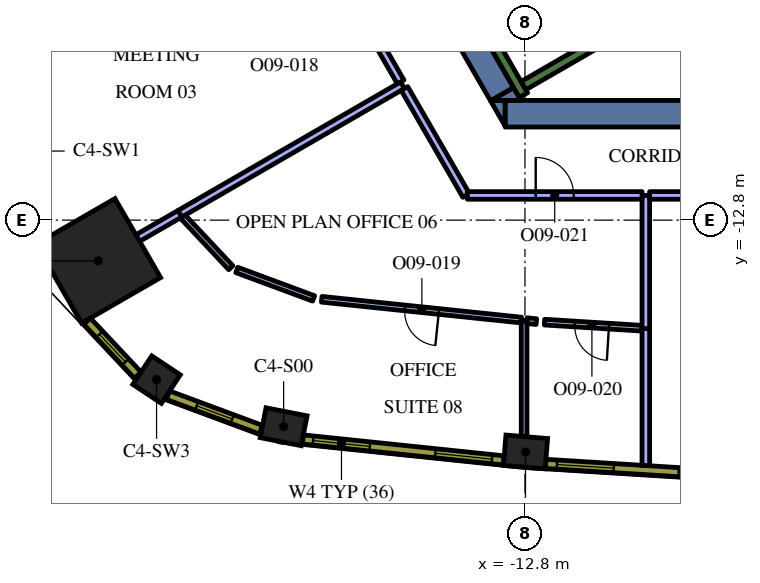
"""IFC4 building model, lengths in metres.
Left out: names, types, materials, properties, quantities, classifications, styles, units other than length and angle.
Written with IfcOpenShell. Run it as: python <this file> out.ifc"""

import sys

from ifc_helpers import new_model, si_unit, direction, frame, frame_2d, origin, origin_2d, place, context, subcontext, project, spatial, polyline, rectangle, outline, extrude, element, fill, save


model = new_model("IFC4")
c1 = context("Model", 3, precision=1e-05, world=origin(), true_north=direction((0.0, 1.0)))
c2 = subcontext(c1, "Body", "Model", "MODEL_VIEW")
j1 = project(units=[si_unit("LENGTHUNIT", "METRE"), si_unit("PLANEANGLEUNIT", "RADIAN")], contexts=[c1])
p1 = place(None, origin())
s1 = spatial("IfcSite", under=j1, at=p1, CompositionType="ELEMENT")
p2 = place(p1, origin())
s2 = spatial("IfcBuilding", under=s1, at=p2, CompositionType="ELEMENT")
p3 = place(p2, frame((0.0, 0.0, 239.4)))
s3 = spatial("IfcBuildingStorey", under=s2, at=p3, CompositionType="ELEMENT", Elevation=239.4)
p4 = place(p3, frame((-24.027, -13.872, 0.0), z_axis=(0.0, 0.0, 1.0), x_axis=(-0.866025403784, -0.5, 0.0)))
e1 = element("IfcColumn", 1, at=p4, inside=s3, PredefinedType="COLUMN", context=c2, shape_type="SweptSolid", body=[
    extrude(rectangle(XDim=2.4, YDim=2.4, at=origin_2d()), origin(), (0.0, 0.0, 1.0), 4.2),
])
for number, where, z_axis, x_axis in (
    (2, (-19.15, -18.237, 0.0), (0.0, 0.0, 1.0), (0.981, -0.192, 0.0)),
    (3, (-12.785, -18.9, 0.0), (0.0, 0.0, 1.0), (0.997, -0.083, 0.0)),
):
    element("IfcColumn", number, at=place(p3, frame(where, z_axis=z_axis, x_axis=x_axis)), inside=s3, PredefinedType="COLUMN", context=c2, shape_type="SweptSolid", body=[
        extrude(rectangle(XDim=1.1, YDim=0.8, at=origin_2d()), origin(), (0.0, 0.0, 1.0), 4.2),
    ])
p5 = place(p3, frame((-22.494, -16.997, 0.0), z_axis=(0.0, 0.0, 1.0), x_axis=(0.833238868178, -0.552913183563, 0.0)))
e4 = element("IfcColumn", 4, at=p5, inside=s3, PredefinedType="COLUMN", context=c2, shape_type="SweptSolid", body=[
    extrude(rectangle(XDim=0.9, YDim=0.9, at=origin_2d()), origin(), (0.0, 0.0, 1.0), 4.2),
])
p6 = place(p3, frame((8.904, -10.0, 0.0), z_axis=(0.0, 0.0, 1.0), x_axis=(-1.0, 0.0, 0.0)))
e5 = element("IfcWall", 5, at=p6, inside=s3, PredefinedType="SOLIDWALL", context=c2, shape_type="SweptSolid", body=[
    extrude(rectangle(XDim=22.226, YDim=0.7, at=frame_2d((11.113, 0.0))), origin(), (0.0, 0.0, 1.0), 4.2),
])
p7 = place(p3, origin())
e6 = element("IfcWall", 6, at=p7, inside=s3, PredefinedType="SOLIDWALL", context=c2, shape_type="SweptSolid", body=[
    extrude(outline(polyline([(-13.712, -9.65), (-13.324, -9.65), (-13.324, -10.322), (-13.712, -9.65)])), origin(), (0.0, 0.0, 1.0), 4.2),
])
p8 = place(p3, frame((-13.402, -9.487, 0.0), z_axis=(0.0, 0.0, 1.0), x_axis=(-0.500020498207, 0.866013568815, 0.0)))
e7 = element("IfcWall", 7, at=p8, inside=s3, PredefinedType="SOLIDWALL", context=c2, shape_type="SweptSolid", body=[
    extrude(rectangle(XDim=3.829, YDim=0.7, at=frame_2d((1.915, 0.0))), origin(), (0.0, 0.0, 1.0), 4.2),
])
e8 = element("IfcWall", 8, at=p7, inside=s3, PredefinedType="SOLIDWALL", context=c2, shape_type="SweptSolid", body=[
    extrude(outline(polyline([(-12.904, -9.65), (-13.68, -9.65), (-13.098, -9.314), (-12.904, -9.65)])), origin(), (0.0, 0.0, 1.0), 4.2),
])
p9 = place(p3, frame((-12.84, -9.511, 0.0), z_axis=(0.0, 0.0, 1.0), x_axis=(-0.499997733992, 0.866026712061, 0.0)))
e9 = element("IfcWall", 9, at=p9, inside=s3, PredefinedType="SOLIDWALL", context=c2, shape_type="SweptSolid", body=[
    extrude(rectangle(XDim=3.634, YDim=0.25, at=frame_2d((1.817, 0.0))), origin(), (0.0, 0.0, 1.0), 4.2),
])
p10 = place(p3, frame((-12.84, -9.261, 0.0), z_axis=(0.0, 0.0, 1.0), x_axis=(0.866016039709, 0.500016218704, 0.0)))
e10 = element("IfcWall", 10, at=p10, inside=s3, PredefinedType="SOLIDWALL", context=c2, shape_type="SweptSolid", body=[
    extrude(rectangle(XDim=7.05, YDim=0.25, at=frame_2d((3.525, 0.0))), origin(), (0.0, 0.0, 1.0), 4.2),
])
p11 = place(p3, frame((-9.62, -19.257, 0.0), z_axis=(0.0, 0.0, 1.0), x_axis=(0.0, 1.0, 0.0)))
e11 = element("IfcWall", 11, at=p11, inside=s3, PredefinedType="PARTITIONING", context=c2, shape_type="SweptSolid", body=[
    extrude(rectangle(XDim=3.611, YDim=0.2, at=frame_2d((1.806, 0.0))), origin(), (0.0, 0.0, 1.0), 3.45),
])
p12 = place(p3, frame((-9.62, -15.654, 0.0), z_axis=(0.0, 0.0, 1.0), x_axis=(0.0, 1.0, 0.0)))
e12 = element("IfcWall", 12, at=p12, inside=s3, PredefinedType="PARTITIONING", context=c2, shape_type="SweptSolid", body=[
    extrude(rectangle(XDim=3.504, YDim=0.2, at=frame_2d((1.752, 0.0))), origin(), (0.0, 0.0, 1.0), 3.45),
])
p13 = place(p3, frame((-9.52, -12.15, 0.0), z_axis=(0.0, 0.0, 1.0), x_axis=(1.0, 0.0, 0.0)))
e13 = element("IfcWall", 13, at=p13, inside=s3, PredefinedType="PARTITIONING", context=c2, shape_type="SweptSolid", body=[
    extrude(rectangle(XDim=2.49, YDim=0.2, at=frame_2d((1.245, 0.0))), origin(), (0.0, 0.0, 1.0), 3.45),
])
p14 = place(p3, frame((-21.873, -12.628, 0.0), z_axis=(0.0, 0.0, 1.0), x_axis=(-0.866052988967, -0.499952218018, 0.0)))
e14 = element("IfcWall", 14, at=p14, inside=s3, PredefinedType="PARTITIONING", context=c2, shape_type="SweptSolid", body=[
    extrude(rectangle(XDim=1.288, YDim=0.2, at=frame_2d((0.644, 0.0))), origin(), (0.0, 0.0, 1.0), 3.45),
])
p15 = place(p3, frame((-16.021, -9.25, 0.0), z_axis=(0.0, 0.0, 1.0), x_axis=(-0.86602692059, -0.499997372806, 0.0)))
e15 = element("IfcWall", 15, at=p15, inside=s3, PredefinedType="PARTITIONING", context=c2, shape_type="SweptSolid", body=[
    extrude(rectangle(XDim=6.765, YDim=0.2, at=frame_2d((3.382, 0.0))), origin(), (0.0, 0.0, 1.0), 3.45),
])
p16 = place(p3, frame((-17.545, -6.612, 0.0), z_axis=(0.0, 0.0, 1.0), x_axis=(0.500006981563, -0.86602137294, 0.0)))
e16 = element("IfcWall", 16, at=p16, inside=s3, PredefinedType="PARTITIONING", context=c2, shape_type="SweptSolid", body=[
    extrude(rectangle(XDim=2.946, YDim=0.2, at=frame_2d((1.473, 0.0))), origin(), (0.0, 0.0, 1.0), 3.45),
])
p17 = place(p3, frame((-12.823, -15.437, 0.0), z_axis=(0.0, 0.0, 1.0), x_axis=(0.0, -1.0, 0.0)))
e17 = element("IfcWall", 17, at=p17, inside=s3, PredefinedType="PARTITIONING", context=c2, shape_type="SweptSolid", body=[
    extrude(rectangle(XDim=3.058, YDim=0.15, at=frame_2d((1.529, 0.0))), origin(), (0.0, 0.0, 1.0), 3.45),
])
p18 = place(p3, frame((-21.806, -12.705, 0.0), z_axis=(0.0, 0.0, 1.0), x_axis=(0.684700980092, -0.728824099396, 0.0)))
e18 = element("IfcWall", 18, at=p18, inside=s3, PredefinedType="PARTITIONING", context=c2, shape_type="SweptSolid", body=[
    extrude(rectangle(XDim=1.848, YDim=0.15, at=frame_2d((0.924, 0.0))), origin(), (0.0, 0.0, 1.0), 3.45),
])
p19 = place(p3, frame((-20.383, -14.111, 0.0), z_axis=(0.0, 0.0, 1.0), x_axis=(0.937598383102, -0.347720105838, 0.0)))
e19 = element("IfcWall", 19, at=p19, inside=s3, PredefinedType="PARTITIONING", context=c2, shape_type="SweptSolid", body=[
    extrude(rectangle(XDim=2.156, YDim=0.15, at=frame_2d((1.078, 0.0))), origin(), (0.0, 0.0, 1.0), 3.45),
])
p20 = place(p3, frame((-12.898, -15.429, 0.0), z_axis=(0.0, 0.0, 1.0), x_axis=(-0.99462039429, 0.103587022653, 0.0)))
e20 = element("IfcWall", 20, at=p20, inside=s3, PredefinedType="PARTITIONING", context=c2, shape_type="SweptSolid", body=[
    extrude(rectangle(XDim=5.279, YDim=0.15, at=frame_2d((2.64, 0.0))), origin(), (0.0, 0.0, 1.0), 3.45),
])
p21 = place(p20, frame((2.179, 0.0, 0.0)))
e21 = element("IfcOpeningElement", 21, at=p21, cuts=e20, PredefinedType="OPENING", context=c2, shape_type="SweptSolid", body=[
    extrude(rectangle(XDim=0.9, YDim=2.1, at=frame_2d((0.45, 1.05))), frame((0.0, 0.085, 0.0), z_axis=(0.0, -1.0, 0.0), x_axis=(1.0, 0.0, 0.0)), (0.0, 0.0, 1.0), 0.17),
])
p22 = place(p3, frame((-12.748, -15.445, 0.0), z_axis=(0.0, 0.0, 1.0), x_axis=(0.99468140225, -0.102999553487, 0.0)))
e22 = element("IfcWall", 22, at=p22, inside=s3, PredefinedType="PARTITIONING", context=c2, shape_type="SweptSolid", body=[
    extrude(rectangle(XDim=0.249, YDim=0.15, at=frame_2d((0.125, 0.0))), origin(), (0.0, 0.0, 1.0), 3.45),
])
p23 = place(p3, frame((-9.72, -15.644, 0.0), z_axis=(0.0, 0.0, 1.0), x_axis=(-0.998064382534, 0.062189133425, 0.0)))
e23 = element("IfcWall", 23, at=p23, inside=s3, PredefinedType="PARTITIONING", context=c2, shape_type="SweptSolid", body=[
    extrude(rectangle(XDim=2.571, YDim=0.15, at=frame_2d((1.286, 0.0))), origin(), (0.0, 0.0, 1.0), 3.45),
])
p24 = place(p23, frame((0.871, 0.0, 0.0)))
e24 = element("IfcOpeningElement", 24, at=p24, cuts=e23, PredefinedType="OPENING", context=c2, shape_type="SweptSolid", body=[
    extrude(rectangle(XDim=0.9, YDim=2.1, at=frame_2d((0.45, 1.05))), frame((0.0, 0.085, 0.0), z_axis=(0.0, -1.0, 0.0), x_axis=(1.0, 0.0, 0.0)), (0.0, 0.0, 1.0), 0.17),
])
p25 = place(p3, frame((-15.971, -9.337, 0.0), z_axis=(0.0, 0.0, 1.0), x_axis=(0.500010870188, -0.866019127788, 0.0)))
e25 = element("IfcWall", 25, at=p25, inside=s3, PredefinedType="PARTITIONING", context=c2, shape_type="SweptSolid", body=[
    extrude(rectangle(XDim=3.249, YDim=0.2, at=frame_2d((1.624, 0.0))), origin(), (0.0, 0.0, 1.0), 3.45),
])
p26 = place(p3, frame((-14.317, -12.15, 0.0), z_axis=(0.0, 0.0, 1.0), x_axis=(1.0, 0.0, 0.0)))
e26 = element("IfcWall", 26, at=p26, inside=s3, PredefinedType="PARTITIONING", context=c2, shape_type="SweptSolid", body=[
    extrude(rectangle(XDim=4.597, YDim=0.2, at=frame_2d((2.299, 0.0))), origin(), (0.0, 0.0, 1.0), 3.45),
])
p27 = place(p26, frame((1.8, 0.0, 0.0)))
e27 = element("IfcOpeningElement", 27, at=p27, cuts=e26, PredefinedType="OPENING", context=c2, shape_type="SweptSolid", body=[
    extrude(rectangle(XDim=1.0, YDim=2.1, at=frame_2d((0.5, 1.05))), frame((0.0, 0.11, 0.0), z_axis=(0.0, -1.0, 0.0), x_axis=(1.0, 0.0, 0.0)), (0.0, 0.0, 1.0), 0.22),
])
p28 = place(p3, frame((-18.644, -18.571, 0.0), z_axis=(0.0, 0.0, 1.0), x_axis=(0.994621961215, -0.103571976272, 0.0)))
e28 = element("IfcWall", 28, at=p28, inside=s3, PredefinedType="SOLIDWALL", context=c2, shape_type="SweptSolid", body=[
    extrude(rectangle(XDim=5.311, YDim=0.24, at=frame_2d((2.655, 0.0))), origin(), (0.0, 0.0, 1.0), 3.95),
])
p29 = place(p28, frame((0.271, 0.0, 0.9)))
e29 = element("IfcOpeningElement", 29, at=p29, cuts=e28, PredefinedType="OPENING", context=c2, shape_type="SweptSolid", body=[
    extrude(rectangle(XDim=1.5, YDim=2.55, at=frame_2d((0.75, 1.275))), frame((0.0, 0.13, 0.0), z_axis=(0.0, -1.0, 0.0), x_axis=(1.0, 0.0, 0.0)), (0.0, 0.0, 1.0), 0.26),
])
p30 = place(p28, frame((3.504, 0.0, 0.9)))
e30 = element("IfcOpeningElement", 30, at=p30, cuts=e28, PredefinedType="OPENING", context=c2, shape_type="SweptSolid", body=[
    extrude(rectangle(XDim=1.5, YDim=2.55, at=frame_2d((0.75, 1.275))), frame((0.0, 0.13, 0.0), z_axis=(0.0, -1.0, 0.0), x_axis=(1.0, 0.0, 0.0)), (0.0, 0.0, 1.0), 0.26),
])
p31 = place(p3, frame((-12.253, -19.213, 0.0), z_axis=(0.0, 0.0, 1.0), x_axis=(0.9980633213, -0.062206162685, 0.0)))
e31 = element("IfcWall", 31, at=p31, inside=s3, PredefinedType="SOLIDWALL", context=c2, shape_type="SweptSolid", body=[
    extrude(rectangle(XDim=5.298, YDim=0.24, at=frame_2d((2.649, 0.0))), origin(), (0.0, 0.0, 1.0), 3.95),
])
p32 = place(p31, frame((0.294, 0.0, 0.9)))
e32 = element("IfcOpeningElement", 32, at=p32, cuts=e31, PredefinedType="OPENING", context=c2, shape_type="SweptSolid", body=[
    extrude(rectangle(XDim=1.5, YDim=2.55, at=frame_2d((0.75, 1.275))), frame((0.0, 0.13, 0.0), z_axis=(0.0, -1.0, 0.0), x_axis=(1.0, 0.0, 0.0)), (0.0, 0.0, 1.0), 0.26),
])
p33 = place(p31, frame((3.504, 0.0, 0.9)))
e33 = element("IfcOpeningElement", 33, at=p33, cuts=e31, PredefinedType="OPENING", context=c2, shape_type="SweptSolid", body=[
    extrude(rectangle(XDim=1.5, YDim=2.55, at=frame_2d((0.75, 1.275))), frame((0.0, 0.13, 0.0), z_axis=(0.0, -1.0, 0.0), x_axis=(1.0, 0.0, 0.0)), (0.0, 0.0, 1.0), 0.26),
])
p34 = place(p3, frame((-24.323, -15.459, 0.0), z_axis=(0.0, 0.0, 1.0), x_axis=(0.684770274166, -0.728758994194, 0.0)))
e34 = element("IfcWall", 34, at=p34, inside=s3, PredefinedType="SOLIDWALL", context=c2, shape_type="SweptSolid", body=[
    extrude(rectangle(XDim=1.948, YDim=0.24, at=frame_2d((0.974, 0.0))), origin(), (0.0, 0.0, 1.0), 3.95),
])
p35 = place(p34, frame((0.474, 0.0, 0.9)))
e35 = element("IfcOpeningElement", 35, at=p35, cuts=e34, PredefinedType="OPENING", context=c2, shape_type="SweptSolid", body=[
    extrude(rectangle(XDim=1.0, YDim=2.55, at=frame_2d((0.5, 1.275))), frame((0.0, 0.13, 0.0), z_axis=(0.0, -1.0, 0.0), x_axis=(1.0, 0.0, 0.0)), (0.0, 0.0, 1.0), 0.26),
])
p36 = place(p3, frame((-22.194, -17.406, 0.0), z_axis=(0.0, 0.0, 1.0), x_axis=(0.937569171184, -0.347798863203, 0.0)))
e36 = element("IfcWall", 36, at=p36, inside=s3, PredefinedType="SOLIDWALL", context=c2, shape_type="SweptSolid", body=[
    extrude(rectangle(XDim=2.609, YDim=0.24, at=frame_2d((1.305, 0.0))), origin(), (0.0, 0.0, 1.0), 3.95),
])
p37 = place(p36, frame((0.805, 0.0, 0.9)))
e37 = element("IfcOpeningElement", 37, at=p37, cuts=e36, PredefinedType="OPENING", context=c2, shape_type="SweptSolid", body=[
    extrude(rectangle(XDim=1.0, YDim=2.55, at=frame_2d((0.5, 1.275))), frame((0.0, 0.13, 0.0), z_axis=(0.0, -1.0, 0.0), x_axis=(1.0, 0.0, 0.0)), (0.0, 0.0, 1.0), 0.26),
])
p38 = place(p21, origin())
e38 = element("IfcDoor", 38, at=p38, inside=s3, OperationType="SINGLE_SWING_LEFT", PredefinedType="DOOR", context=c2, shape_type="SweptSolid", body=[
    extrude(rectangle(XDim=0.9, YDim=2.1, at=frame_2d((0.45, 1.05))), frame((0.0, 0.025, 0.0), z_axis=(0.0, -1.0, 0.0), x_axis=(1.0, 0.0, 0.0)), (0.0, 0.0, 1.0), 0.05),
])
fill(e21, e38)
p39 = place(p24, origin())
e39 = element("IfcDoor", 39, at=p39, inside=s3, OperationType="SINGLE_SWING_RIGHT", PredefinedType="DOOR", context=c2, shape_type="SweptSolid", body=[
    extrude(rectangle(XDim=0.9, YDim=2.1, at=frame_2d((0.45, 1.05))), frame((0.0, 0.025, 0.0), z_axis=(0.0, -1.0, 0.0), x_axis=(1.0, 0.0, 0.0)), (0.0, 0.0, 1.0), 0.05),
])
fill(e24, e39)
p40 = place(p27, origin())
e40 = element("IfcDoor", 40, at=p40, inside=s3, OperationType="SINGLE_SWING_RIGHT", PredefinedType="DOOR", context=c2, shape_type="SweptSolid", body=[
    extrude(rectangle(XDim=1.0, YDim=2.1, at=frame_2d((0.5, 1.05))), frame((0.0, 0.025, 0.0), z_axis=(0.0, -1.0, 0.0), x_axis=(1.0, 0.0, 0.0)), (0.0, 0.0, 1.0), 0.05),
])
fill(e27, e40)
p41 = place(p29, origin())
e41 = element("IfcWindow", 41, at=p41, inside=s3, PartitioningType="SINGLE_PANEL", PredefinedType="WINDOW", context=c2, shape_type="SweptSolid", body=[
    extrude(rectangle(XDim=1.5, YDim=2.55, at=frame_2d((0.75, 1.275))), frame((0.0, 0.04, 0.0), z_axis=(0.0, -1.0, 0.0), x_axis=(1.0, 0.0, 0.0)), (0.0, 0.0, 1.0), 0.06),
])
fill(e29, e41)
p42 = place(p30, origin())
e42 = element("IfcWindow", 42, at=p42, inside=s3, PartitioningType="SINGLE_PANEL", PredefinedType="WINDOW", context=c2, shape_type="SweptSolid", body=[
    extrude(rectangle(XDim=1.5, YDim=2.55, at=frame_2d((0.75, 1.275))), frame((0.0, 0.04, 0.0), z_axis=(0.0, -1.0, 0.0), x_axis=(1.0, 0.0, 0.0)), (0.0, 0.0, 1.0), 0.06),
])
fill(e30, e42)
p43 = place(p32, origin())
e43 = element("IfcWindow", 43, at=p43, inside=s3, PartitioningType="SINGLE_PANEL", PredefinedType="WINDOW", context=c2, shape_type="SweptSolid", body=[
    extrude(rectangle(XDim=1.5, YDim=2.55, at=frame_2d((0.75, 1.275))), frame((0.0, 0.04, 0.0), z_axis=(0.0, -1.0, 0.0), x_axis=(1.0, 0.0, 0.0)), (0.0, 0.0, 1.0), 0.06),
])
fill(e32, e43)
p44 = place(p33, origin())
e44 = element("IfcWindow", 44, at=p44, inside=s3, PartitioningType="SINGLE_PANEL", PredefinedType="WINDOW", context=c2, shape_type="SweptSolid", body=[
    extrude(rectangle(XDim=1.5, YDim=2.55, at=frame_2d((0.75, 1.275))), frame((0.0, 0.04, 0.0), z_axis=(0.0, -1.0, 0.0), x_axis=(1.0, 0.0, 0.0)), (0.0, 0.0, 1.0), 0.06),
])
fill(e33, e44)
p45 = place(p35, origin())
e45 = element("IfcWindow", 45, at=p45, inside=s3, PartitioningType="SINGLE_PANEL", PredefinedType="WINDOW", context=c2, shape_type="SweptSolid", body=[
    extrude(rectangle(XDim=1.0, YDim=2.55, at=frame_2d((0.5, 1.275))), frame((0.0, 0.04, 0.0), z_axis=(0.0, -1.0, 0.0), x_axis=(1.0, 0.0, 0.0)), (0.0, 0.0, 1.0), 0.06),
])
fill(e35, e45)
p46 = place(p37, origin())
e46 = element("IfcWindow", 46, at=p46, inside=s3, PartitioningType="SINGLE_PANEL", PredefinedType="WINDOW", context=c2, shape_type="SweptSolid", body=[
    extrude(rectangle(XDim=1.0, YDim=2.55, at=frame_2d((0.5, 1.275))), frame((0.0, 0.04, 0.0), z_axis=(0.0, -1.0, 0.0), x_axis=(1.0, 0.0, 0.0)), (0.0, 0.0, 1.0), 0.06),
])
fill(e37, e46)
save(model, sys.argv[1])
